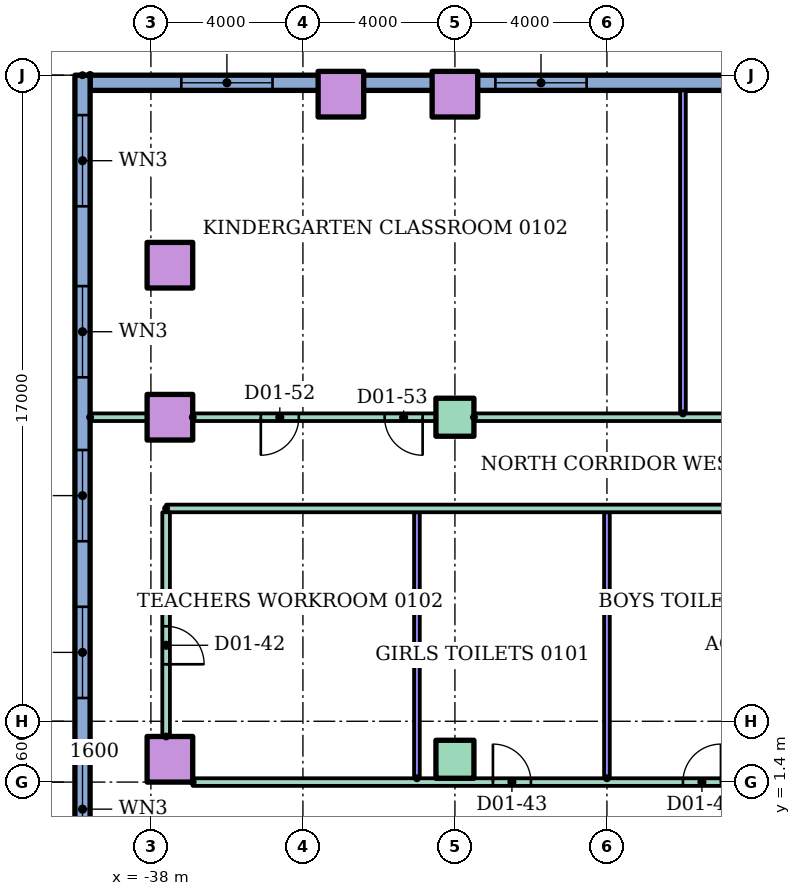
"""IFC4 building model, lengths in metres.
Left out: names, types, materials, properties, quantities, classifications, styles, units other than length and angle.
Written with IfcOpenShell. Run it as: python <this file> out.ifc"""

import sys

from ifc_helpers import new_model, si_unit, direction, frame, frame_2d, origin, origin_2d, place, context, subcontext, project, spatial, rectangle, hollow_rectangle, extrude, element, fill, save


model = new_model("IFC4")
c1 = context("Model", 3, precision=1e-05, world=origin(), true_north=direction((0.0, 1.0)))
c2 = subcontext(c1, "Body", "Model", "MODEL_VIEW")
j1 = project(units=[si_unit("LENGTHUNIT", "METRE"), si_unit("PLANEANGLEUNIT", "RADIAN")], contexts=[c1])
p1 = place(None, origin())
s1 = spatial("IfcSite", under=j1, at=p1, CompositionType="ELEMENT")
p2 = place(p1, origin())
s2 = spatial("IfcBuilding", under=s1, at=p2, CompositionType="ELEMENT")
p3 = place(p2, frame((0.0, 0.0, 6.0)))
s3 = spatial("IfcBuildingStorey", under=s2, at=p3, CompositionType="ELEMENT", Elevation=6.0)
p4 = place(p3, frame((-37.5, 2.0, 0.0)))
e1 = element("IfcColumn", 1, at=p4, inside=s3, PredefinedType="COLUMN", context=c2, shape_type="SweptSolid", body=[
    extrude(hollow_rectangle(XDim=1.2, YDim=1.2, WallThickness=0.06, at=origin_2d()), origin(), (0.0, 0.0, 1.0), 4.0),
])
p5 = place(p3, frame((-30.0, 2.0, 0.0)))
e2 = element("IfcColumn", 2, at=p5, inside=s3, PredefinedType="COLUMN", context=c2, shape_type="SweptSolid", body=[
    extrude(rectangle(XDim=1.0, YDim=1.0, at=origin_2d()), origin(), (0.0, 0.0, 1.0), 4.0),
])
p6 = place(p3, frame((-37.5, 11.0, 0.0)))
e3 = element("IfcColumn", 3, at=p6, inside=s3, PredefinedType="COLUMN", context=c2, shape_type="SweptSolid", body=[
    extrude(hollow_rectangle(XDim=1.2, YDim=1.2, WallThickness=0.06, at=origin_2d()), origin(), (0.0, 0.0, 1.0), 4.0),
])
p7 = place(p3, frame((-30.0, 11.0, 0.0)))
e4 = element("IfcColumn", 4, at=p7, inside=s3, PredefinedType="COLUMN", context=c2, shape_type="SweptSolid", body=[
    extrude(rectangle(XDim=1.0, YDim=1.0, at=origin_2d()), origin(), (0.0, 0.0, 1.0), 4.0),
])
for number, where in (
    (5, (-37.5, 15.0, 0.0)),
    (6, (-33.0, 19.5, 0.0)),
    (7, (-30.0, 19.5, 0.0)),
):
    element("IfcColumn", number, at=place(p3, frame(where)), inside=s3, PredefinedType="COLUMN", context=c2, shape_type="SweptSolid", body=[
        extrude(hollow_rectangle(XDim=1.2, YDim=1.2, WallThickness=0.06, at=origin_2d()), origin(), (0.0, 0.0, 1.0), 4.0),
    ])
p8 = place(p3, frame((-14.0, 19.8, 0.0), z_axis=(0.0, 0.0, 1.0), x_axis=(-1.0, 0.0, 0.0)))
e8 = element("IfcWall", 8, at=p8, inside=s3, PredefinedType="STANDARD", context=c2, shape_type="SweptSolid", body=[
    extrude(rectangle(XDim=25.6, YDim=0.4, at=frame_2d((12.8, 0.0))), origin(), (0.0, 0.0, 1.0), 3.7),
])
p9 = place(p8, frame((0.8, 0.0, 0.9)))
e9 = element("IfcOpeningElement", 9, at=p9, cuts=e8, PredefinedType="OPENING", context=c2, shape_type="SweptSolid", body=[
    extrude(rectangle(XDim=2.4, YDim=2.1, at=frame_2d((1.2, 1.05))), frame((0.0, 0.21, 0.0), z_axis=(0.0, -1.0, 0.0), x_axis=(1.0, 0.0, 0.0)), (0.0, 0.0, 1.0), 0.42),
])
p10 = place(p8, frame((4.535, 0.0, 0.9)))
e10 = element("IfcOpeningElement", 10, at=p10, cuts=e8, PredefinedType="OPENING", context=c2, shape_type="SweptSolid", body=[
    extrude(rectangle(XDim=2.4, YDim=2.1, at=frame_2d((1.2, 1.05))), frame((0.0, 0.21, 0.0), z_axis=(0.0, -1.0, 0.0), x_axis=(1.0, 0.0, 0.0)), (0.0, 0.0, 1.0), 0.42),
])
p11 = place(p8, frame((12.535, 0.0, 0.9)))
e11 = element("IfcOpeningElement", 11, at=p11, cuts=e8, PredefinedType="OPENING", context=c2, shape_type="SweptSolid", body=[
    extrude(rectangle(XDim=2.4, YDim=2.1, at=frame_2d((1.2, 1.05))), frame((0.0, 0.21, 0.0), z_axis=(0.0, -1.0, 0.0), x_axis=(1.0, 0.0, 0.0)), (0.0, 0.0, 1.0), 0.42),
])
p12 = place(p8, frame((20.8, 0.0, 0.9)))
e12 = element("IfcOpeningElement", 12, at=p12, cuts=e8, PredefinedType="OPENING", context=c2, shape_type="SweptSolid", body=[
    extrude(rectangle(XDim=2.4, YDim=2.1, at=frame_2d((1.2, 1.05))), frame((0.0, 0.21, 0.0), z_axis=(0.0, -1.0, 0.0), x_axis=(1.0, 0.0, 0.0)), (0.0, 0.0, 1.0), 0.42),
])
p13 = place(p3, frame((-39.8, 20.0, 0.0), z_axis=(0.0, 0.0, 1.0), x_axis=(0.0, -1.0, 0.0)))
e13 = element("IfcWall", 13, at=p13, inside=s3, PredefinedType="STANDARD", context=c2, shape_type="SweptSolid", body=[
    extrude(rectangle(XDim=70.0, YDim=0.4, at=frame_2d((35.0, 0.0))), origin(), (0.0, 0.0, 1.0), 3.7),
])
p14 = place(p13, frame((1.05, 0.0, 0.9)))
e14 = element("IfcOpeningElement", 14, at=p14, cuts=e13, PredefinedType="OPENING", context=c2, shape_type="SweptSolid", body=[
    extrude(rectangle(XDim=2.4, YDim=2.1, at=frame_2d((1.2, 1.05))), frame((0.0, 0.21, 0.0), z_axis=(0.0, -1.0, 0.0), x_axis=(1.0, 0.0, 0.0)), (0.0, 0.0, 1.0), 0.42),
])
p15 = place(p13, frame((5.55, 0.0, 0.9)))
e15 = element("IfcOpeningElement", 15, at=p15, cuts=e13, PredefinedType="OPENING", context=c2, shape_type="SweptSolid", body=[
    extrude(rectangle(XDim=2.4, YDim=2.1, at=frame_2d((1.2, 1.05))), frame((0.0, 0.21, 0.0), z_axis=(0.0, -1.0, 0.0), x_axis=(1.0, 0.0, 0.0)), (0.0, 0.0, 1.0), 0.42),
])
p16 = place(p13, frame((9.863, 0.0, 0.9)))
e16 = element("IfcOpeningElement", 16, at=p16, cuts=e13, PredefinedType="OPENING", context=c2, shape_type="SweptSolid", body=[
    extrude(rectangle(XDim=2.4, YDim=2.1, at=frame_2d((1.2, 1.05))), frame((0.0, 0.21, 0.0), z_axis=(0.0, -1.0, 0.0), x_axis=(1.0, 0.0, 0.0)), (0.0, 0.0, 1.0), 0.42),
])
p17 = place(p13, frame((13.988, 0.0, 0.9)))
e17 = element("IfcOpeningElement", 17, at=p17, cuts=e13, PredefinedType="OPENING", context=c2, shape_type="SweptSolid", body=[
    extrude(rectangle(XDim=2.4, YDim=2.1, at=frame_2d((1.2, 1.05))), frame((0.0, 0.21, 0.0), z_axis=(0.0, -1.0, 0.0), x_axis=(1.0, 0.0, 0.0)), (0.0, 0.0, 1.0), 0.42),
])
p18 = place(p13, frame((18.113, 0.0, 0.9)))
e18 = element("IfcOpeningElement", 18, at=p18, cuts=e13, PredefinedType="OPENING", context=c2, shape_type="SweptSolid", body=[
    extrude(rectangle(XDim=2.4, YDim=2.1, at=frame_2d((1.2, 1.05))), frame((0.0, 0.21, 0.0), z_axis=(0.0, -1.0, 0.0), x_axis=(1.0, 0.0, 0.0)), (0.0, 0.0, 1.0), 0.42),
])
p19 = place(p13, frame((22.238, 0.0, 0.9)))
e19 = element("IfcOpeningElement", 19, at=p19, cuts=e13, PredefinedType="OPENING", context=c2, shape_type="SweptSolid", body=[
    extrude(rectangle(XDim=2.4, YDim=2.1, at=frame_2d((1.2, 1.05))), frame((0.0, 0.21, 0.0), z_axis=(0.0, -1.0, 0.0), x_axis=(1.0, 0.0, 0.0)), (0.0, 0.0, 1.0), 0.42),
])
p20 = place(p13, frame((26.363, 0.0, 0.9)))
e20 = element("IfcOpeningElement", 20, at=p20, cuts=e13, PredefinedType="OPENING", context=c2, shape_type="SweptSolid", body=[
    extrude(rectangle(XDim=2.4, YDim=2.1, at=frame_2d((1.2, 1.05))), frame((0.0, 0.21, 0.0), z_axis=(0.0, -1.0, 0.0), x_axis=(1.0, 0.0, 0.0)), (0.0, 0.0, 1.0), 0.42),
])
p21 = place(p13, frame((30.488, 0.0, 0.9)))
e21 = element("IfcOpeningElement", 21, at=p21, cuts=e13, PredefinedType="OPENING", context=c2, shape_type="SweptSolid", body=[
    extrude(rectangle(XDim=2.4, YDim=2.1, at=frame_2d((1.2, 1.05))), frame((0.0, 0.21, 0.0), z_axis=(0.0, -1.0, 0.0), x_axis=(1.0, 0.0, 0.0)), (0.0, 0.0, 1.0), 0.42),
])
p22 = place(p13, frame((34.613, 0.0, 0.9)))
e22 = element("IfcOpeningElement", 22, at=p22, cuts=e13, PredefinedType="OPENING", context=c2, shape_type="SweptSolid", body=[
    extrude(rectangle(XDim=2.4, YDim=2.1, at=frame_2d((1.2, 1.05))), frame((0.0, 0.21, 0.0), z_axis=(0.0, -1.0, 0.0), x_axis=(1.0, 0.0, 0.0)), (0.0, 0.0, 1.0), 0.42),
])
p23 = place(p13, frame((38.738, 0.0, 0.9)))
e23 = element("IfcOpeningElement", 23, at=p23, cuts=e13, PredefinedType="OPENING", context=c2, shape_type="SweptSolid", body=[
    extrude(rectangle(XDim=2.4, YDim=2.1, at=frame_2d((1.2, 1.05))), frame((0.0, 0.21, 0.0), z_axis=(0.0, -1.0, 0.0), x_axis=(1.0, 0.0, 0.0)), (0.0, 0.0, 1.0), 0.42),
])
p24 = place(p13, frame((53.633, 0.0, 0.9)))
e24 = element("IfcOpeningElement", 24, at=p24, cuts=e13, PredefinedType="OPENING", context=c2, shape_type="SweptSolid", body=[
    extrude(rectangle(XDim=2.4, YDim=2.1, at=frame_2d((1.2, 1.05))), frame((0.0, 0.21, 0.0), z_axis=(0.0, -1.0, 0.0), x_axis=(1.0, 0.0, 0.0)), (0.0, 0.0, 1.0), 0.42),
])
p25 = place(p13, frame((57.3, 0.0, 0.9)))
e25 = element("IfcOpeningElement", 25, at=p25, cuts=e13, PredefinedType="OPENING", context=c2, shape_type="SweptSolid", body=[
    extrude(rectangle(XDim=2.4, YDim=2.1, at=frame_2d((1.2, 1.05))), frame((0.0, 0.21, 0.0), z_axis=(0.0, -1.0, 0.0), x_axis=(1.0, 0.0, 0.0)), (0.0, 0.0, 1.0), 0.42),
])
p26 = place(p13, frame((60.967, 0.0, 0.9)))
e26 = element("IfcOpeningElement", 26, at=p26, cuts=e13, PredefinedType="OPENING", context=c2, shape_type="SweptSolid", body=[
    extrude(rectangle(XDim=2.4, YDim=2.1, at=frame_2d((1.2, 1.05))), frame((0.0, 0.21, 0.0), z_axis=(0.0, -1.0, 0.0), x_axis=(1.0, 0.0, 0.0)), (0.0, 0.0, 1.0), 0.42),
])
p27 = place(p13, frame((66.85, 0.0, 0.9)))
e27 = element("IfcOpeningElement", 27, at=p27, cuts=e13, PredefinedType="OPENING", context=c2, shape_type="SweptSolid", body=[
    extrude(rectangle(XDim=2.4, YDim=2.1, at=frame_2d((1.2, 1.05))), frame((0.0, 0.21, 0.0), z_axis=(0.0, -1.0, 0.0), x_axis=(1.0, 0.0, 0.0)), (0.0, 0.0, 1.0), 0.42),
])
p28 = place(p3, frame((-36.9, 1.4, 0.0)))
e28 = element("IfcWall", 28, at=p28, inside=s3, PredefinedType="PARTITIONING", context=c2, shape_type="SweptSolid", body=[
    extrude(rectangle(XDim=20.6, YDim=0.2, at=frame_2d((10.3, 0.0))), origin(), (0.0, 0.0, 1.0), 3.7),
])
p29 = place(p28, frame((7.9, 0.0, 0.0)))
e29 = element("IfcOpeningElement", 29, at=p29, cuts=e28, PredefinedType="OPENING", context=c2, shape_type="SweptSolid", body=[
    extrude(rectangle(XDim=1.0, YDim=2.1, at=frame_2d((0.5, 1.05))), frame((0.0, 0.11, 0.0), z_axis=(0.0, -1.0, 0.0), x_axis=(1.0, 0.0, 0.0)), (0.0, 0.0, 1.0), 0.22),
])
p30 = place(p28, frame((12.9, 0.0, 0.0)))
e30 = element("IfcOpeningElement", 30, at=p30, cuts=e28, PredefinedType="OPENING", context=c2, shape_type="SweptSolid", body=[
    extrude(rectangle(XDim=1.0, YDim=2.1, at=frame_2d((0.5, 1.05))), frame((0.0, 0.11, 0.0), z_axis=(0.0, -1.0, 0.0), x_axis=(1.0, 0.0, 0.0)), (0.0, 0.0, 1.0), 0.22),
])
p31 = place(p28, frame((16.6, 0.0, 0.0)))
e31 = element("IfcOpeningElement", 31, at=p31, cuts=e28, PredefinedType="OPENING", context=c2, shape_type="SweptSolid", body=[
    extrude(rectangle(XDim=1.0, YDim=2.1, at=frame_2d((0.5, 1.05))), frame((0.0, 0.11, 0.0), z_axis=(0.0, -1.0, 0.0), x_axis=(1.0, 0.0, 0.0)), (0.0, 0.0, 1.0), 0.22),
])
p32 = place(p28, frame((18.95, 0.0, 0.0)))
e32 = element("IfcOpeningElement", 32, at=p32, cuts=e28, PredefinedType="OPENING", context=c2, shape_type="SweptSolid", body=[
    extrude(rectangle(XDim=0.9, YDim=2.1, at=frame_2d((0.45, 1.05))), frame((0.0, 0.11, 0.0), z_axis=(0.0, -1.0, 0.0), x_axis=(1.0, 0.0, 0.0)), (0.0, 0.0, 1.0), 0.22),
])
p33 = place(p3, frame((-37.6, 8.6, 0.0)))
e33 = element("IfcWall", 33, at=p33, inside=s3, PredefinedType="PARTITIONING", context=c2, shape_type="SweptSolid", body=[
    extrude(rectangle(XDim=21.3, YDim=0.2, at=frame_2d((10.65, 0.0))), origin(), (0.0, 0.0, 1.0), 3.7),
])
p34 = place(p3, frame((-39.6, 11.0, 0.0)))
e34 = element("IfcWall", 34, at=p34, inside=s3, PredefinedType="PARTITIONING", context=c2, shape_type="SweptSolid", body=[
    extrude(rectangle(XDim=1.5, YDim=0.2, at=frame_2d((0.75, 0.0))), origin(), (0.0, 0.0, 1.0), 3.7),
])
p35 = place(p3, frame((-36.9, 11.0, 0.0)))
e35 = element("IfcWall", 35, at=p35, inside=s3, PredefinedType="PARTITIONING", context=c2, shape_type="SweptSolid", body=[
    extrude(rectangle(XDim=6.4, YDim=0.2, at=frame_2d((3.2, 0.0))), origin(), (0.0, 0.0, 1.0), 3.7),
])
p36 = place(p35, frame((1.792, 0.0, 0.0)))
e36 = element("IfcOpeningElement", 36, at=p36, cuts=e35, PredefinedType="OPENING", context=c2, shape_type="SweptSolid", body=[
    extrude(rectangle(XDim=1.0, YDim=2.1, at=frame_2d((0.5, 1.05))), frame((0.0, 0.11, 0.0), z_axis=(0.0, -1.0, 0.0), x_axis=(1.0, 0.0, 0.0)), (0.0, 0.0, 1.0), 0.22),
])
p37 = place(p35, frame((5.05, 0.0, 0.0)))
e37 = element("IfcOpeningElement", 37, at=p37, cuts=e35, PredefinedType="OPENING", context=c2, shape_type="SweptSolid", body=[
    extrude(rectangle(XDim=1.0, YDim=2.1, at=frame_2d((0.5, 1.05))), frame((0.0, 0.11, 0.0), z_axis=(0.0, -1.0, 0.0), x_axis=(1.0, 0.0, 0.0)), (0.0, 0.0, 1.0), 0.22),
])
p38 = place(p3, frame((-29.5, 11.0, 0.0)))
e38 = element("IfcWall", 38, at=p38, inside=s3, PredefinedType="PARTITIONING", context=c2, shape_type="SweptSolid", body=[
    extrude(rectangle(XDim=7.0, YDim=0.2, at=frame_2d((3.5, 0.0))), origin(), (0.0, 0.0, 1.0), 3.7),
])
p39 = place(p3, frame((-37.6, 2.6, 0.0), z_axis=(0.0, 0.0, 1.0), x_axis=(0.0, 1.0, 0.0)))
e39 = element("IfcWall", 39, at=p39, inside=s3, PredefinedType="PARTITIONING", context=c2, shape_type="SweptSolid", body=[
    extrude(rectangle(XDim=5.9, YDim=0.2, at=frame_2d((2.95, 0.0))), origin(), (0.0, 0.0, 1.0), 3.7),
])
p40 = place(p39, frame((1.9, 0.0, 0.0)))
e40 = element("IfcOpeningElement", 40, at=p40, cuts=e39, PredefinedType="OPENING", context=c2, shape_type="SweptSolid", body=[
    extrude(rectangle(XDim=1.0, YDim=2.1, at=frame_2d((0.5, 1.05))), frame((0.0, 0.11, 0.0), z_axis=(0.0, -1.0, 0.0), x_axis=(1.0, 0.0, 0.0)), (0.0, 0.0, 1.0), 0.22),
])
for number, where, z_axis, x_axis in (
    (41, (-31.0, 1.5, 0.0), (0.0, 0.0, 1.0), (0.0, 1.0, 0.0)),
    (42, (-26.0, 1.5, 0.0), (0.0, 0.0, 1.0), (0.0, 1.0, 0.0)),
):
    element("IfcWall", number, at=place(p3, frame(where, z_axis=z_axis, x_axis=x_axis)), inside=s3, PredefinedType="PARTITIONING", context=c2, shape_type="SweptSolid", body=[
        extrude(rectangle(XDim=7.0, YDim=0.15, at=frame_2d((3.5, 0.0))), origin(), (0.0, 0.0, 1.0), 3.7),
    ])
p41 = place(p3, frame((-24.0, 11.1, 0.0), z_axis=(0.0, 0.0, 1.0), x_axis=(0.0, 1.0, 0.0)))
e43 = element("IfcWall", 43, at=p41, inside=s3, PredefinedType="PARTITIONING", context=c2, shape_type="SweptSolid", body=[
    extrude(rectangle(XDim=8.5, YDim=0.15, at=frame_2d((4.25, 0.0))), origin(), (0.0, 0.0, 1.0), 3.7),
])
p42 = place(p11, origin())
e44 = element("IfcWindow", 44, at=p42, inside=s3, PartitioningType="SINGLE_PANEL", PredefinedType="WINDOW", context=c2, shape_type="SweptSolid", body=[
    extrude(rectangle(XDim=2.4, YDim=2.1, at=frame_2d((1.2, 1.05))), frame((0.0, 0.03, 0.0), z_axis=(0.0, -1.0, 0.0), x_axis=(1.0, 0.0, 0.0)), (0.0, 0.0, 1.0), 0.06),
])
fill(e11, e44)
p43 = place(p12, origin())
e45 = element("IfcWindow", 45, at=p43, inside=s3, PartitioningType="SINGLE_PANEL", PredefinedType="WINDOW", context=c2, shape_type="SweptSolid", body=[
    extrude(rectangle(XDim=2.4, YDim=2.1, at=frame_2d((1.2, 1.05))), frame((0.0, 0.03, 0.0), z_axis=(0.0, -1.0, 0.0), x_axis=(1.0, 0.0, 0.0)), (0.0, 0.0, 1.0), 0.06),
])
fill(e12, e45)
p44 = place(p14, origin())
e46 = element("IfcWindow", 46, at=p44, inside=s3, PartitioningType="SINGLE_PANEL", PredefinedType="WINDOW", context=c2, shape_type="SweptSolid", body=[
    extrude(rectangle(XDim=2.4, YDim=2.1, at=frame_2d((1.2, 1.05))), frame((0.0, 0.03, 0.0), z_axis=(0.0, -1.0, 0.0), x_axis=(1.0, 0.0, 0.0)), (0.0, 0.0, 1.0), 0.06),
])
fill(e14, e46)
p45 = place(p15, origin())
e47 = element("IfcWindow", 47, at=p45, inside=s3, PartitioningType="SINGLE_PANEL", PredefinedType="WINDOW", context=c2, shape_type="SweptSolid", body=[
    extrude(rectangle(XDim=2.4, YDim=2.1, at=frame_2d((1.2, 1.05))), frame((0.0, 0.03, 0.0), z_axis=(0.0, -1.0, 0.0), x_axis=(1.0, 0.0, 0.0)), (0.0, 0.0, 1.0), 0.06),
])
fill(e15, e47)
p46 = place(p16, origin())
e48 = element("IfcWindow", 48, at=p46, inside=s3, PartitioningType="SINGLE_PANEL", PredefinedType="WINDOW", context=c2, shape_type="SweptSolid", body=[
    extrude(rectangle(XDim=2.4, YDim=2.1, at=frame_2d((1.2, 1.05))), frame((0.0, 0.03, 0.0), z_axis=(0.0, -1.0, 0.0), x_axis=(1.0, 0.0, 0.0)), (0.0, 0.0, 1.0), 0.06),
])
fill(e16, e48)
p47 = place(p17, origin())
e49 = element("IfcWindow", 49, at=p47, inside=s3, PartitioningType="SINGLE_PANEL", PredefinedType="WINDOW", context=c2, shape_type="SweptSolid", body=[
    extrude(rectangle(XDim=2.4, YDim=2.1, at=frame_2d((1.2, 1.05))), frame((0.0, 0.03, 0.0), z_axis=(0.0, -1.0, 0.0), x_axis=(1.0, 0.0, 0.0)), (0.0, 0.0, 1.0), 0.06),
])
fill(e17, e49)
p48 = place(p18, origin())
e50 = element("IfcWindow", 50, at=p48, inside=s3, PartitioningType="SINGLE_PANEL", PredefinedType="WINDOW", context=c2, shape_type="SweptSolid", body=[
    extrude(rectangle(XDim=2.4, YDim=2.1, at=frame_2d((1.2, 1.05))), frame((0.0, 0.03, 0.0), z_axis=(0.0, -1.0, 0.0), x_axis=(1.0, 0.0, 0.0)), (0.0, 0.0, 1.0), 0.06),
])
fill(e18, e50)
p49 = place(p40, frame((1.0, 0.0, 0.0), z_axis=(0.0, 0.0, 1.0), x_axis=(-1.0, 0.0, 0.0)))
e51 = element("IfcDoor", 51, at=p49, inside=s3, OperationType="SINGLE_SWING_LEFT", PredefinedType="DOOR", context=c2, shape_type="SweptSolid", body=[
    extrude(rectangle(XDim=1.0, YDim=2.1, at=frame_2d((0.5, 1.05))), frame((0.0, 0.025, 0.0), z_axis=(0.0, -1.0, 0.0), x_axis=(1.0, 0.0, 0.0)), (0.0, 0.0, 1.0), 0.05),
])
fill(e40, e51)
p50 = place(p29, origin())
e52 = element("IfcDoor", 52, at=p50, inside=s3, OperationType="SINGLE_SWING_LEFT", PredefinedType="DOOR", context=c2, shape_type="SweptSolid", body=[
    extrude(rectangle(XDim=1.0, YDim=2.1, at=frame_2d((0.5, 1.05))), frame((0.0, 0.025, 0.0), z_axis=(0.0, -1.0, 0.0), x_axis=(1.0, 0.0, 0.0)), (0.0, 0.0, 1.0), 0.05),
])
fill(e29, e52)
p51 = place(p30, origin())
e53 = element("IfcDoor", 53, at=p51, inside=s3, OperationType="SINGLE_SWING_RIGHT", PredefinedType="DOOR", context=c2, shape_type="SweptSolid", body=[
    extrude(rectangle(XDim=1.0, YDim=2.1, at=frame_2d((0.5, 1.05))), frame((0.0, 0.025, 0.0), z_axis=(0.0, -1.0, 0.0), x_axis=(1.0, 0.0, 0.0)), (0.0, 0.0, 1.0), 0.05),
])
fill(e30, e53)
p52 = place(p36, frame((1.0, 0.0, 0.0), z_axis=(0.0, 0.0, 1.0), x_axis=(-1.0, 0.0, 0.0)))
e54 = element("IfcDoor", 54, at=p52, inside=s3, OperationType="SINGLE_SWING_LEFT", PredefinedType="DOOR", context=c2, shape_type="SweptSolid", body=[
    extrude(rectangle(XDim=1.0, YDim=2.1, at=frame_2d((0.5, 1.05))), frame((0.0, 0.025, 0.0), z_axis=(0.0, -1.0, 0.0), x_axis=(1.0, 0.0, 0.0)), (0.0, 0.0, 1.0), 0.05),
])
fill(e36, e54)
p53 = place(p37, frame((1.0, 0.0, 0.0), z_axis=(0.0, 0.0, 1.0), x_axis=(-1.0, 0.0, 0.0)))
e55 = element("IfcDoor", 55, at=p53, inside=s3, OperationType="SINGLE_SWING_RIGHT", PredefinedType="DOOR", context=c2, shape_type="SweptSolid", body=[
    extrude(rectangle(XDim=1.0, YDim=2.1, at=frame_2d((0.5, 1.05))), frame((0.0, 0.025, 0.0), z_axis=(0.0, -1.0, 0.0), x_axis=(1.0, 0.0, 0.0)), (0.0, 0.0, 1.0), 0.05),
])
fill(e37, e55)
save(model, sys.argv[1])
